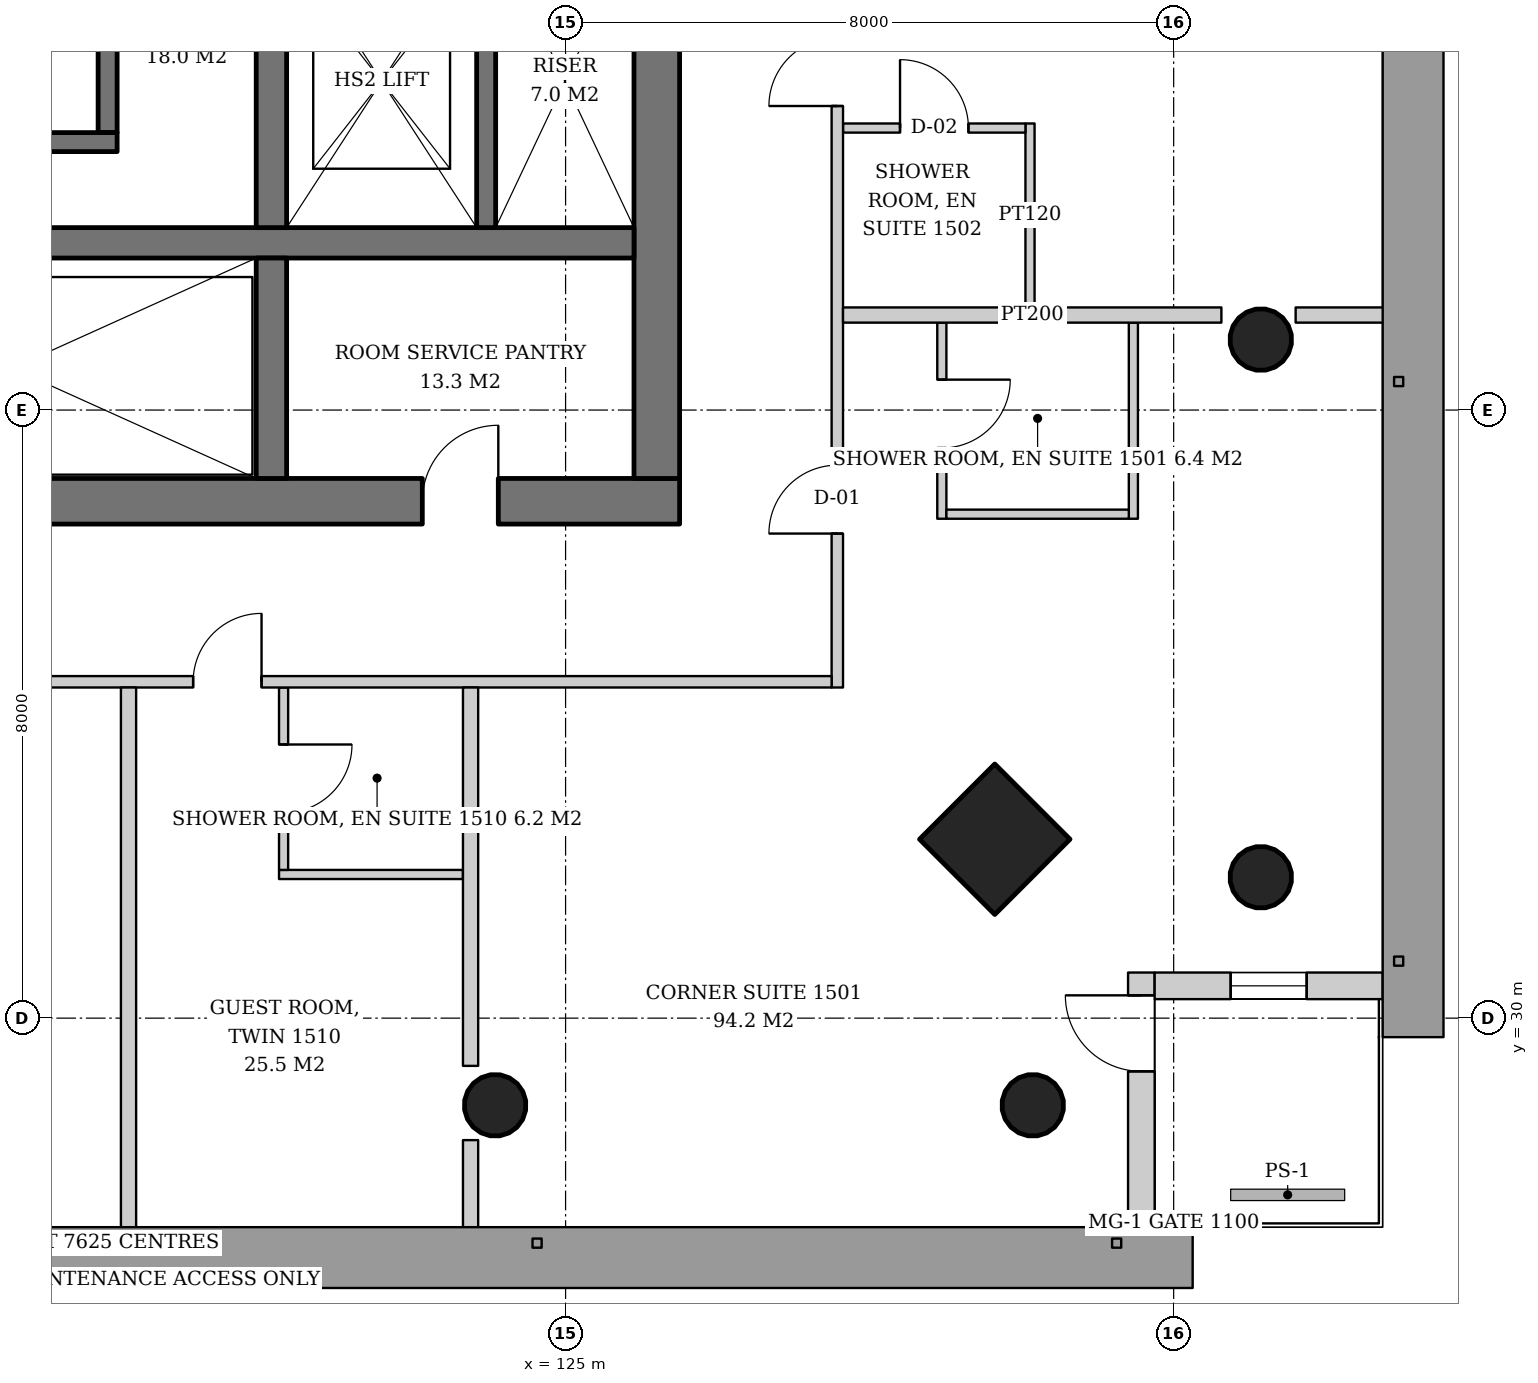
"""IFC4 building model, lengths in metres.
Left out: names, types, materials, properties, quantities, classifications, styles, units other than length and angle.
Written with IfcOpenShell. Run it as: python <this file> out.ifc"""

import sys

from ifc_helpers import new_model, si_unit, direction, frame, frame_2d, origin, origin_2d, place, context, subcontext, project, spatial, rectangle, hollow_circle, extrude, element, fill, save


model = new_model("IFC4")
c1 = context("Model", 3, precision=1e-05, world=origin(), true_north=direction((0.0, 1.0)))
c2 = subcontext(c1, "Body", "Model", "MODEL_VIEW")
j1 = project(units=[si_unit("LENGTHUNIT", "METRE"), si_unit("PLANEANGLEUNIT", "RADIAN")], contexts=[c1])
p1 = place(None, origin())
s1 = spatial("IfcSite", under=j1, at=p1, CompositionType="ELEMENT")
p2 = place(p1, origin())
s2 = spatial("IfcBuilding", under=s1, at=p2, CompositionType="ELEMENT")
p3 = place(p2, frame((0.0, 0.0, 62.8)))
s3 = spatial("IfcBuildingStorey", under=s2, at=p3, CompositionType="ELEMENT", Elevation=62.8)
p4 = place(p3, frame((134.198, 31.802, 0.0), z_axis=(-0.043029647111, 0.043029647111, 0.998146732169), x_axis=(-0.707106781187, -0.707106781187, 0.0)))
e1 = element("IfcColumn", 1, at=p4, inside=s3, PredefinedType="COLUMN", context=c2, shape_type="SweptSolid", body=[
    extrude(hollow_circle(Radius=0.406, WallThickness=0.03, at=origin_2d()), origin(), (0.0, 0.0, 1.0), 3.807),
])
p5 = place(p3, frame((134.198, 38.901, 0.0), z_axis=(-0.043059584825, 0.021497706284, 0.998841188968), x_axis=(-0.446680166538, -0.894693706707, 0.0)))
e2 = element("IfcColumn", 2, at=p5, inside=s3, PredefinedType="COLUMN", context=c2, shape_type="SweptSolid", body=[
    extrude(hollow_circle(Radius=0.406, WallThickness=0.03, at=origin_2d()), origin(), (0.0, 0.0, 1.0), 3.804),
])
p6 = place(p3, frame((130.698, 32.302, 0.0), z_axis=(-0.043029647111, 0.043029647111, 0.998146732169), x_axis=(-0.707106781187, -0.707106781187, 0.0)))
e3 = element("IfcColumn", 3, at=p6, inside=s3, PredefinedType="COLUMN", context=c2, shape_type="SweptSolid", body=[
    extrude(rectangle(XDim=1.4, YDim=1.4, at=origin_2d()), origin(), (0.0, 0.0, 1.0), 3.807),
])
p7 = place(p3, frame((131.198, 28.802, 0.0), z_axis=(-0.043029647111, 0.043029647111, 0.998146732169), x_axis=(-0.707106781187, -0.707106781187, 0.0)))
e4 = element("IfcColumn", 4, at=p7, inside=s3, PredefinedType="COLUMN", context=c2, shape_type="SweptSolid", body=[
    extrude(hollow_circle(Radius=0.406, WallThickness=0.03, at=origin_2d()), origin(), (0.0, 0.0, 1.0), 3.807),
])
p8 = place(p3, frame((124.099, 28.802, 0.0), z_axis=(-0.021497706284, 0.043059584825, 0.998841188968), x_axis=(-0.894693706707, -0.446680166538, 0.0)))
e5 = element("IfcColumn", 5, at=p8, inside=s3, PredefinedType="COLUMN", context=c2, shape_type="SweptSolid", body=[
    extrude(hollow_circle(Radius=0.406, WallThickness=0.03, at=origin_2d()), origin(), (0.0, 0.0, 1.0), 3.804),
])
p9 = place(p3, frame((107.5, 36.8, 0.0), z_axis=(0.0, 0.0, 1.0), x_axis=(1.0, 0.0, 0.0)))
e6 = element("IfcWall", 6, at=p9, inside=s3, PredefinedType="SHEAR", context=c2, shape_type="SweptSolid", body=[
    extrude(rectangle(XDim=19.0, YDim=0.6, at=frame_2d((9.5, 0.0))), origin(), (0.0, 0.0, 1.0), 3.8),
])
p10 = place(p9, frame((3.9, 0.0, 0.0)))
e7 = element("IfcOpeningElement", 7, at=p10, cuts=e6, PredefinedType="OPENING", context=c2, shape_type="SweptSolid", body=[
    extrude(rectangle(XDim=1.0, YDim=2.1, at=frame_2d((0.5, 1.05))), frame((0.0, 0.31, 0.0), z_axis=(0.0, -1.0, 0.0), x_axis=(1.0, 0.0, 0.0)), (0.0, 0.0, 1.0), 0.62),
])
p11 = place(p9, frame((15.615, 0.0, 0.0)))
e8 = element("IfcOpeningElement", 8, at=p11, cuts=e6, PredefinedType="OPENING", context=c2, shape_type="SweptSolid", body=[
    extrude(rectangle(XDim=1.0, YDim=2.1, at=frame_2d((0.5, 1.05))), frame((0.0, 0.31, 0.0), z_axis=(0.0, -1.0, 0.0), x_axis=(1.0, 0.0, 0.0)), (0.0, 0.0, 1.0), 0.62),
])
p12 = place(p3, frame((126.2, 37.1, 0.0), z_axis=(0.0, 0.0, 1.0), x_axis=(0.0, 1.0, 0.0)))
e9 = element("IfcWall", 9, at=p12, inside=s3, PredefinedType="SHEAR", context=c2, shape_type="SweptSolid", body=[
    extrude(rectangle(XDim=17.8, YDim=0.6, at=frame_2d((8.9, 0.0))), origin(), (0.0, 0.0, 1.0), 3.8),
])
p13 = place(p12, frame((8.0, 0.0, 0.0)))
e10 = element("IfcOpeningElement", 10, at=p13, cuts=e9, PredefinedType="OPENING", context=c2, shape_type="SweptSolid", body=[
    extrude(rectangle(XDim=1.8, YDim=2.4, at=frame_2d((0.9, 1.2))), frame((0.0, 0.31, 0.0), z_axis=(0.0, -1.0, 0.0), x_axis=(1.0, 0.0, 0.0)), (0.0, 0.0, 1.0), 0.62),
])
p14 = place(p3, frame((108.1, 40.2, 0.0), z_axis=(0.0, 0.0, 1.0), x_axis=(1.0, 0.0, 0.0)))
e11 = element("IfcWall", 11, at=p14, inside=s3, PredefinedType="SHEAR", context=c2, shape_type="SweptSolid", body=[
    extrude(rectangle(XDim=17.8, YDim=0.4, at=frame_2d((8.9, 0.0))), origin(), (0.0, 0.0, 1.0), 3.8),
])
p15 = place(p3, frame((121.13, 37.1, 0.0), z_axis=(0.0, 0.0, 1.0), x_axis=(0.0, 1.0, 0.0)))
e12 = element("IfcWall", 12, at=p15, inside=s3, PredefinedType="SHEAR", context=c2, shape_type="SweptSolid", body=[
    extrude(rectangle(XDim=2.9, YDim=0.4, at=frame_2d((1.45, 0.0))), origin(), (0.0, 0.0, 1.0), 3.8),
])
p16 = place(p3, frame((121.13, 40.4, 0.0), z_axis=(0.0, 0.0, 1.0), x_axis=(0.0, 1.0, 0.0)))
e13 = element("IfcWall", 13, at=p16, inside=s3, PredefinedType="SHEAR", context=c2, shape_type="SweptSolid", body=[
    extrude(rectangle(XDim=11.2, YDim=0.4, at=frame_2d((5.6, 0.0))), origin(), (0.0, 0.0, 1.0), 3.8),
])
p17 = place(p3, frame((132.575, 27.25, 0.0), z_axis=(0.0, 0.0, 1.0), x_axis=(0.0, 1.0, 0.0)))
e14 = element("IfcWall", 14, at=p17, inside=s3, PredefinedType="SOLIDWALL", context=c2, shape_type="SweptSolid", body=[
    extrude(rectangle(XDim=3.35, YDim=0.35, at=frame_2d((1.675, 0.0))), origin(), (0.0, 0.0, 1.0), 3.6),
])
p18 = place(p17, frame((2.05, 0.0, 0.0)))
e15 = element("IfcOpeningElement", 15, at=p18, cuts=e14, PredefinedType="OPENING", context=c2, shape_type="SweptSolid", body=[
    extrude(rectangle(XDim=1.0, YDim=2.4, at=frame_2d((0.5, 1.2))), frame((0.0, 0.185, 0.0), z_axis=(0.0, -1.0, 0.0), x_axis=(1.0, 0.0, 0.0)), (0.0, 0.0, 1.0), 0.37),
])
p19 = place(p3, frame((132.75, 30.425, 0.0), z_axis=(0.0, 0.0, 1.0), x_axis=(1.0, 0.0, 0.0)))
e16 = element("IfcWall", 16, at=p19, inside=s3, PredefinedType="SOLIDWALL", context=c2, shape_type="SweptSolid", body=[
    extrude(rectangle(XDim=3.0, YDim=0.35, at=frame_2d((1.5, 0.0))), origin(), (0.0, 0.0, 1.0), 3.6),
])
p20 = place(p19, frame((1.0, 0.0, 0.9)))
e17 = element("IfcOpeningElement", 17, at=p20, cuts=e16, PredefinedType="OPENING", context=c2, shape_type="SweptSolid", body=[
    extrude(rectangle(XDim=1.0, YDim=2.4, at=frame_2d((0.5, 1.2))), frame((0.0, 0.185, 0.0), z_axis=(0.0, -1.0, 0.0), x_axis=(1.0, 0.0, 0.0)), (0.0, 0.0, 1.0), 0.37),
])
p21 = place(p3, frame((118.975, 44.25, 0.0), z_axis=(0.0, 0.0, 1.0), x_axis=(0.0, -1.0, 0.0)))
e18 = element("IfcWall", 18, at=p21, inside=s3, PredefinedType="SHEAR", context=c2, shape_type="SweptSolid", body=[
    extrude(rectangle(XDim=2.6, YDim=0.25, at=frame_2d((1.3, 0.0))), origin(), (0.0, 0.0, 1.0), 3.8),
])
p22 = place(p3, frame((108.1, 41.525, 0.0), z_axis=(0.0, 0.0, 1.0), x_axis=(1.0, 0.0, 0.0)))
e19 = element("IfcWall", 19, at=p22, inside=s3, PredefinedType="SHEAR", context=c2, shape_type="SweptSolid", body=[
    extrude(rectangle(XDim=11.0, YDim=0.25, at=frame_2d((5.5, 0.0))), origin(), (0.0, 0.0, 1.0), 3.8),
])
p23 = place(p3, frame((123.955, 44.25, 0.0), z_axis=(0.0, 0.0, 1.0), x_axis=(0.0, -1.0, 0.0)))
e20 = element("IfcWall", 20, at=p23, inside=s3, PredefinedType="SHEAR", context=c2, shape_type="SweptSolid", body=[
    extrude(rectangle(XDim=3.85, YDim=0.25, at=frame_2d((1.925, 0.0))), origin(), (0.0, 0.0, 1.0), 3.8),
])
p24 = place(p3, frame((129.95, 39.15, 0.0), z_axis=(0.0, 0.0, 1.0), x_axis=(0.0, -1.0, 0.0)))
e21 = element("IfcWall", 21, at=p24, inside=s3, PredefinedType="PARTITIONING", context=c2, shape_type="SweptSolid", body=[
    extrude(rectangle(XDim=2.58, YDim=0.12, at=frame_2d((1.29, 0.0))), origin(), (0.0, 0.0, 1.0), 2.8),
])
p25 = place(p24, frame((0.75, 0.0, 0.0)))
e22 = element("IfcOpeningElement", 22, at=p25, cuts=e21, PredefinedType="OPENING", context=c2, shape_type="SweptSolid", body=[
    extrude(rectangle(XDim=0.9, YDim=2.1, at=frame_2d((0.45, 1.05))), frame((0.0, 0.07, 0.0), z_axis=(0.0, -1.0, 0.0), x_axis=(1.0, 0.0, 0.0)), (0.0, 0.0, 1.0), 0.14),
])
p26 = place(p3, frame((132.47, 39.15, 0.0), z_axis=(0.0, 0.0, 1.0), x_axis=(0.0, -1.0, 0.0)))
e23 = element("IfcWall", 23, at=p26, inside=s3, PredefinedType="PARTITIONING", context=c2, shape_type="SweptSolid", body=[
    extrude(rectangle(XDim=2.58, YDim=0.12, at=frame_2d((1.29, 0.0))), origin(), (0.0, 0.0, 1.0), 2.8),
])
p27 = place(p3, frame((130.01, 36.63, 0.0), z_axis=(0.0, 0.0, 1.0), x_axis=(1.0, 0.0, 0.0)))
e24 = element("IfcWall", 24, at=p27, inside=s3, PredefinedType="PARTITIONING", context=c2, shape_type="SweptSolid", body=[
    extrude(rectangle(XDim=2.4, YDim=0.12, at=frame_2d((1.2, 0.0))), origin(), (0.0, 0.0, 1.0), 2.8),
])
p28 = place(p3, frame((131.11, 39.35, 0.0), z_axis=(0.0, 0.0, 1.0), x_axis=(0.0, 1.0, 0.0)))
e25 = element("IfcWall", 25, at=p28, inside=s3, PredefinedType="PARTITIONING", context=c2, shape_type="SweptSolid", body=[
    extrude(rectangle(XDim=2.42, YDim=0.12, at=frame_2d((1.21, 0.0))), origin(), (0.0, 0.0, 1.0), 2.847),
])
p29 = place(p3, frame((128.65, 41.71, 0.0), z_axis=(0.0, 0.0, 1.0), x_axis=(1.0, 0.0, 0.0)))
e26 = element("IfcWall", 26, at=p29, inside=s3, PredefinedType="PARTITIONING", context=c2, shape_type="SweptSolid", body=[
    extrude(rectangle(XDim=2.4, YDim=0.12, at=frame_2d((1.2, 0.0))), origin(), (0.0, 0.0, 1.0), 3.6),
])
p30 = place(p29, frame((0.75, 0.0, 0.0)))
e27 = element("IfcOpeningElement", 27, at=p30, cuts=e26, PredefinedType="OPENING", context=c2, shape_type="SweptSolid", body=[
    extrude(rectangle(XDim=0.9, YDim=2.1, at=frame_2d((0.45, 1.05))), frame((0.0, 0.07, 0.0), z_axis=(0.0, -1.0, 0.0), x_axis=(1.0, 0.0, 0.0)), (0.0, 0.0, 1.0), 0.14),
])
p31 = place(p3, frame((128.575, 34.35, 0.0), z_axis=(0.0, 0.0, 1.0), x_axis=(0.0, 1.0, 0.0)))
e28 = element("IfcWall", 28, at=p31, inside=s3, PredefinedType="PARTITIONING", context=c2, shape_type="SweptSolid", body=[
    extrude(rectangle(XDim=23.15, YDim=0.15, at=frame_2d((11.575, 0.0))), origin(), (0.0, 0.0, 1.0), 2.8),
])
p32 = place(p31, frame((2.025, 0.0, 0.0)))
e29 = element("IfcOpeningElement", 29, at=p32, cuts=e28, PredefinedType="OPENING", context=c2, shape_type="SweptSolid", body=[
    extrude(rectangle(XDim=0.9, YDim=2.1, at=frame_2d((0.45, 1.05))), frame((0.0, 0.085, 0.0), z_axis=(0.0, -1.0, 0.0), x_axis=(1.0, 0.0, 0.0)), (0.0, 0.0, 1.0), 0.17),
])
p33 = place(p31, frame((7.65, 0.0, 0.0)))
e30 = element("IfcOpeningElement", 30, at=p33, cuts=e28, PredefinedType="OPENING", context=c2, shape_type="SweptSolid", body=[
    extrude(rectangle(XDim=0.9, YDim=2.1, at=frame_2d((0.45, 1.05))), frame((0.0, 0.085, 0.0), z_axis=(0.0, -1.0, 0.0), x_axis=(1.0, 0.0, 0.0)), (0.0, 0.0, 1.0), 0.17),
])
p34 = place(p31, frame((16.9, 0.0, 0.0)))
e31 = element("IfcOpeningElement", 31, at=p34, cuts=e28, PredefinedType="OPENING", context=c2, shape_type="SweptSolid", body=[
    extrude(rectangle(XDim=0.9, YDim=2.1, at=frame_2d((0.45, 1.05))), frame((0.0, 0.085, 0.0), z_axis=(0.0, -1.0, 0.0), x_axis=(1.0, 0.0, 0.0)), (0.0, 0.0, 1.0), 0.17),
])
p35 = place(p3, frame((128.65, 39.25, 0.0), z_axis=(0.0, 0.0, 1.0), x_axis=(1.0, 0.0, 0.0)))
e32 = element("IfcWall", 32, at=p35, inside=s3, PredefinedType="PARTITIONING", context=c2, shape_type="SweptSolid", body=[
    extrude(rectangle(XDim=4.978, YDim=0.2, at=frame_2d((2.489, 0.0))), origin(), (0.0, 0.0, 1.0), 3.6),
])
p36 = place(p3, frame((134.605, 39.25, 0.0), z_axis=(0.0, 0.0, 1.0), x_axis=(1.0, 0.0, 0.0)))
e33 = element("IfcWall", 33, at=p36, inside=s3, PredefinedType="PARTITIONING", context=c2, shape_type="SweptSolid", body=[
    extrude(rectangle(XDim=1.185, YDim=0.2, at=frame_2d((0.593, 0.0))), origin(), (0.0, 0.0, 1.0), 3.6),
])
p37 = place(p3, frame((121.23, 31.89, 0.0), z_axis=(0.0, 0.0, 1.0), x_axis=(1.0, 0.0, 0.0)))
e34 = element("IfcWall", 34, at=p37, inside=s3, PredefinedType="PARTITIONING", context=c2, shape_type="SweptSolid", body=[
    extrude(rectangle(XDim=2.42, YDim=0.12, at=frame_2d((1.21, 0.0))), origin(), (0.0, 0.0, 1.0), 3.6),
])
p38 = place(p3, frame((121.29, 34.35, 0.0), z_axis=(0.0, 0.0, 1.0), x_axis=(0.0, -1.0, 0.0)))
e35 = element("IfcWall", 35, at=p38, inside=s3, PredefinedType="PARTITIONING", context=c2, shape_type="SweptSolid", body=[
    extrude(rectangle(XDim=2.4, YDim=0.12, at=frame_2d((1.2, 0.0))), origin(), (0.0, 0.0, 1.0), 3.6),
])
p39 = place(p38, frame((0.75, 0.0, 0.0)))
e36 = element("IfcOpeningElement", 36, at=p39, cuts=e35, PredefinedType="OPENING", context=c2, shape_type="SweptSolid", body=[
    extrude(rectangle(XDim=0.9, YDim=2.1, at=frame_2d((0.45, 1.05))), frame((0.0, 0.07, 0.0), z_axis=(0.0, -1.0, 0.0), x_axis=(1.0, 0.0, 0.0)), (0.0, 0.0, 1.0), 0.14),
])
p40 = place(p3, frame((105.35, 34.425, 0.0), z_axis=(0.0, 0.0, 1.0), x_axis=(1.0, 0.0, 0.0)))
e37 = element("IfcWall", 37, at=p40, inside=s3, PredefinedType="PARTITIONING", context=c2, shape_type="SweptSolid", body=[
    extrude(rectangle(XDim=23.15, YDim=0.15, at=frame_2d((11.575, 0.0))), origin(), (0.0, 0.0, 1.0), 2.8),
])
p41 = place(p40, frame((2.025, 0.0, 0.0)))
e38 = element("IfcOpeningElement", 38, at=p41, cuts=e37, PredefinedType="OPENING", context=c2, shape_type="SweptSolid", body=[
    extrude(rectangle(XDim=0.9, YDim=2.1, at=frame_2d((0.45, 1.05))), frame((0.0, 0.085, 0.0), z_axis=(0.0, -1.0, 0.0), x_axis=(1.0, 0.0, 0.0)), (0.0, 0.0, 1.0), 0.17),
])
p42 = place(p40, frame((7.65, 0.0, 0.0)))
e39 = element("IfcOpeningElement", 39, at=p42, cuts=e37, PredefinedType="OPENING", context=c2, shape_type="SweptSolid", body=[
    extrude(rectangle(XDim=0.9, YDim=2.1, at=frame_2d((0.45, 1.05))), frame((0.0, 0.085, 0.0), z_axis=(0.0, -1.0, 0.0), x_axis=(1.0, 0.0, 0.0)), (0.0, 0.0, 1.0), 0.17),
])
p43 = place(p40, frame((14.75, 0.0, 0.0)))
e40 = element("IfcOpeningElement", 40, at=p43, cuts=e37, PredefinedType="OPENING", context=c2, shape_type="SweptSolid", body=[
    extrude(rectangle(XDim=0.9, YDim=2.1, at=frame_2d((0.45, 1.05))), frame((0.0, 0.085, 0.0), z_axis=(0.0, -1.0, 0.0), x_axis=(1.0, 0.0, 0.0)), (0.0, 0.0, 1.0), 0.17),
])
p44 = place(p3, frame((119.25, 34.35, 0.0), z_axis=(0.0, 0.0, 1.0), x_axis=(0.0, -1.0, 0.0)))
e41 = element("IfcWall", 41, at=p44, inside=s3, PredefinedType="PARTITIONING", context=c2, shape_type="SweptSolid", body=[
    extrude(rectangle(XDim=7.14, YDim=0.2, at=frame_2d((3.57, 0.0))), origin(), (0.0, 0.0, 1.0), 3.05),
])
p45 = place(p3, frame((123.75, 34.35, 0.0), z_axis=(0.0, 0.0, 1.0), x_axis=(0.0, -1.0, 0.0)))
e42 = element("IfcWall", 42, at=p45, inside=s3, PredefinedType="PARTITIONING", context=c2, shape_type="SweptSolid", body=[
    extrude(rectangle(XDim=4.978, YDim=0.2, at=frame_2d((2.489, 0.0))), origin(), (0.0, 0.0, 1.0), 3.6),
])
p46 = place(p3, frame((123.75, 28.395, 0.0), z_axis=(0.0, 0.0, 1.0), x_axis=(0.0, -1.0, 0.0)))
e43 = element("IfcWall", 43, at=p46, inside=s3, PredefinedType="PARTITIONING", context=c2, shape_type="SweptSolid", body=[
    extrude(rectangle(XDim=1.185, YDim=0.2, at=frame_2d((0.593, 0.0))), origin(), (0.0, 0.0, 1.0), 3.6),
])
p47 = place(p18, origin())
e44 = element("IfcDoor", 44, at=p47, inside=s3, OperationType="SINGLE_SWING_RIGHT", PredefinedType="DOOR", context=c2, shape_type="SweptSolid", body=[
    extrude(rectangle(XDim=1.0, YDim=2.4, at=frame_2d((0.5, 1.2))), frame((0.0, 0.025, 0.0), z_axis=(0.0, -1.0, 0.0), x_axis=(1.0, 0.0, 0.0)), (0.0, 0.0, 1.0), 0.05),
])
fill(e15, e44)
p48 = place(p20, origin())
e45 = element("IfcWindow", 45, at=p48, inside=s3, PartitioningType="SINGLE_PANEL", PredefinedType="WINDOW", context=c2, shape_type="SweptSolid", body=[
    extrude(rectangle(XDim=1.0, YDim=2.4, at=frame_2d((0.5, 1.2))), frame((0.0, 0.03, 0.0), z_axis=(0.0, -1.0, 0.0), x_axis=(1.0, 0.0, 0.0)), (0.0, 0.0, 1.0), 0.06),
])
fill(e17, e45)
p49 = place(p11, origin())
e46 = element("IfcDoor", 46, at=p49, inside=s3, OperationType="SINGLE_SWING_RIGHT", PredefinedType="DOOR", context=c2, shape_type="SweptSolid", body=[
    extrude(rectangle(XDim=1.0, YDim=2.1, at=frame_2d((0.5, 1.05))), frame((0.0, 0.29, 0.0), z_axis=(0.0, -1.0, 0.0), x_axis=(1.0, 0.0, 0.0)), (0.0, 0.0, 1.0), 0.05),
])
fill(e8, e46)
p50 = place(p25, origin())
e47 = element("IfcDoor", 47, at=p50, inside=s3, OperationType="SINGLE_SWING_LEFT", PredefinedType="DOOR", context=c2, shape_type="SweptSolid", body=[
    extrude(rectangle(XDim=0.9, YDim=2.1, at=frame_2d((0.45, 1.05))), frame((0.0, 0.025, 0.0), z_axis=(0.0, -1.0, 0.0), x_axis=(1.0, 0.0, 0.0)), (0.0, 0.0, 1.0), 0.05),
])
fill(e22, e47)
p51 = place(p30, origin())
e48 = element("IfcDoor", 48, at=p51, inside=s3, OperationType="SINGLE_SWING_LEFT", PredefinedType="DOOR", context=c2, shape_type="SweptSolid", body=[
    extrude(rectangle(XDim=0.9, YDim=2.1, at=frame_2d((0.45, 1.05))), frame((0.0, 0.025, 0.0), z_axis=(0.0, -1.0, 0.0), x_axis=(1.0, 0.0, 0.0)), (0.0, 0.0, 1.0), 0.05),
])
fill(e27, e48)
p52 = place(p32, origin())
e49 = element("IfcDoor", 49, at=p52, inside=s3, OperationType="SINGLE_SWING_LEFT", PredefinedType="DOOR", context=c2, shape_type="SweptSolid", body=[
    extrude(rectangle(XDim=0.9, YDim=2.1, at=frame_2d((0.45, 1.05))), frame((0.0, 0.025, 0.0), z_axis=(0.0, -1.0, 0.0), x_axis=(1.0, 0.0, 0.0)), (0.0, 0.0, 1.0), 0.05),
])
fill(e29, e49)
p53 = place(p33, origin())
e50 = element("IfcDoor", 50, at=p53, inside=s3, OperationType="SINGLE_SWING_LEFT", PredefinedType="DOOR", context=c2, shape_type="SweptSolid", body=[
    extrude(rectangle(XDim=0.9, YDim=2.1, at=frame_2d((0.45, 1.05))), frame((0.0, 0.025, 0.0), z_axis=(0.0, -1.0, 0.0), x_axis=(1.0, 0.0, 0.0)), (0.0, 0.0, 1.0), 0.05),
])
fill(e30, e50)
p54 = place(p39, origin())
e51 = element("IfcDoor", 51, at=p54, inside=s3, OperationType="SINGLE_SWING_LEFT", PredefinedType="DOOR", context=c2, shape_type="SweptSolid", body=[
    extrude(rectangle(XDim=0.9, YDim=2.1, at=frame_2d((0.45, 1.05))), frame((0.0, 0.025, 0.0), z_axis=(0.0, -1.0, 0.0), x_axis=(1.0, 0.0, 0.0)), (0.0, 0.0, 1.0), 0.05),
])
fill(e36, e51)
p55 = place(p43, origin())
e52 = element("IfcDoor", 52, at=p55, inside=s3, OperationType="SINGLE_SWING_RIGHT", PredefinedType="DOOR", context=c2, shape_type="SweptSolid", body=[
    extrude(rectangle(XDim=0.9, YDim=2.1, at=frame_2d((0.45, 1.05))), frame((0.0, 0.025, 0.0), z_axis=(0.0, -1.0, 0.0), x_axis=(1.0, 0.0, 0.0)), (0.0, 0.0, 1.0), 0.05),
])
fill(e40, e52)
save(model, sys.argv[1])
